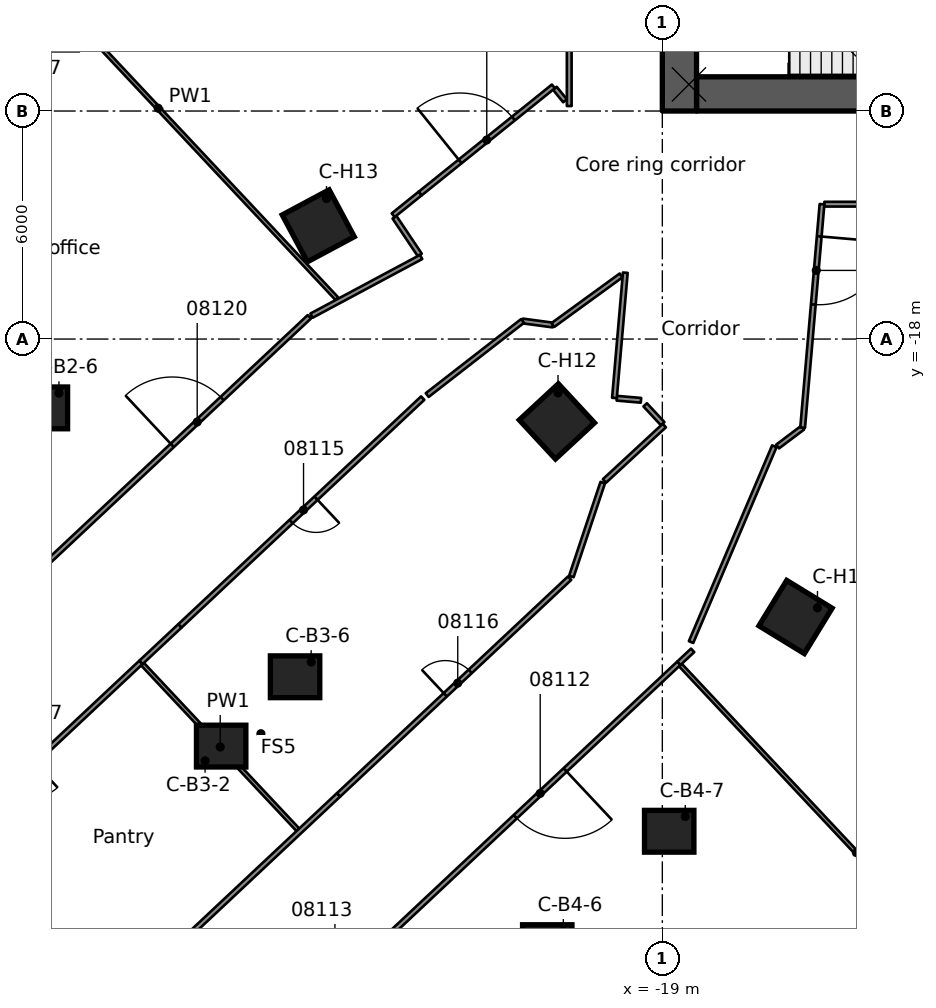
"""IFC4 building model, lengths in metres.
Left out: names, types, materials, properties, quantities, classifications, styles, units other than length and angle.
Written with IfcOpenShell. Run it as: python <this file> out.ifc"""

import sys

from ifc_helpers import new_model, si_unit, direction, frame, frame_2d, origin, origin_2d, place, context, subcontext, project, spatial, rectangle, extrude, element, fill, save


model = new_model("IFC4")
c1 = context("Model", 3, precision=1e-05, world=origin(), true_north=direction((0.0, 1.0)))
c2 = subcontext(c1, "Body", "Model", "MODEL_VIEW")
j1 = project(units=[si_unit("LENGTHUNIT", "METRE"), si_unit("PLANEANGLEUNIT", "RADIAN")], contexts=[c1])
p1 = place(None, origin())
s1 = spatial("IfcSite", under=j1, at=p1, CompositionType="ELEMENT")
p2 = place(p1, origin())
s2 = spatial("IfcBuilding", under=s1, at=p2, CompositionType="ELEMENT")
p3 = place(p2, frame((0.0, 0.0, 37.3)))
s3 = spatial("IfcBuildingStorey", under=s2, at=p3, CompositionType="ELEMENT", Elevation=37.3)
p4 = place(p3, frame((-18.1, -11.55, 0.0), z_axis=(0.0, 0.0, 1.0), x_axis=(1.0, 0.0, 0.0)))
e1 = element("IfcWall", 1, at=p4, inside=s3, PredefinedType="SHEAR", context=c2, shape_type="SweptSolid", body=[
    extrude(rectangle(XDim=9.2, YDim=0.9, at=frame_2d((4.6, 0.0))), origin(), (0.0, 0.0, 1.0), 3.5),
])
p5 = place(p4, frame((5.1, 0.0, 0.0)))
e2 = element("IfcOpeningElement", 2, at=p5, cuts=e1, PredefinedType="OPENING", context=c2, shape_type="SweptSolid", body=[
    extrude(rectangle(XDim=1.1, YDim=2.1, at=frame_2d((0.55, 1.05))), frame((0.0, 0.46, 0.0), z_axis=(0.0, -1.0, 0.0), x_axis=(1.0, 0.0, 0.0)), (0.0, 0.0, 1.0), 0.92),
])
p6 = place(p3, frame((-18.55, -12.0, 0.0), z_axis=(0.0, 0.0, 1.0), x_axis=(0.0, 1.0, 0.0)))
e3 = element("IfcWall", 3, at=p6, inside=s3, PredefinedType="SHEAR", context=c2, shape_type="SweptSolid", body=[
    extrude(rectangle(XDim=24.0, YDim=0.9, at=frame_2d((12.0, 0.0))), origin(), (0.0, 0.0, 1.0), 3.5),
])
p7 = place(p6, frame((10.1, 0.0, 0.0)))
e4 = element("IfcOpeningElement", 4, at=p7, cuts=e3, PredefinedType="OPENING", context=c2, shape_type="SweptSolid", body=[
    extrude(rectangle(XDim=1.8, YDim=2.1, at=frame_2d((0.9, 1.05))), frame((0.0, 0.46, 0.0), z_axis=(0.0, -1.0, 0.0), x_axis=(1.0, 0.0, 0.0)), (0.0, 0.0, 1.0), 0.92),
])
for number, where, z_axis, x_axis in (
    (5, (-35.3, -19.811, 0.0), (0.0, 0.0, 1.0), (1.0, 0.0, 0.0)),
    (6, (-30.609, -28.71, 0.0), (0.0, 0.0, 1.0), (1.0, 0.0, 0.0)),
    (7, (-28.664, -26.886, 0.0), (0.0, 0.0, 1.0), (1.0, 0.0, 0.0)),
    (8, (-22.028, -33.961, 0.0), (0.0, 0.0, 1.0), (1.0, 0.0, 0.0)),
    (9, (-18.819, -30.951, 0.0), (0.0, 0.0, 1.0), (1.0, 0.0, 0.0)),
):
    element("IfcColumn", number, at=place(p3, frame(where, z_axis=z_axis, x_axis=x_axis)), inside=s3, PredefinedType="COLUMN", context=c2, shape_type="SweptSolid", body=[
        extrude(rectangle(XDim=1.3, YDim=1.1, at=origin_2d()), origin(), (0.0, 0.0, 1.0), 3.5),
    ])
for number, where, z_axis, x_axis in (
    (10, (-15.495, -25.313, 0.0), (0.0, 0.0, 1.0), (-0.522, -0.853, 0.0)),
    (11, (-21.774, -20.167, 0.0), (0.0, 0.0, 1.0), (-0.734, -0.68, 0.0)),
    (12, (-28.054, -15.021, 0.0), (0.0, 0.0, 1.0), (-0.882, -0.472, 0.0)),
):
    element("IfcColumn", number, at=place(p3, frame(where, z_axis=z_axis, x_axis=x_axis)), inside=s3, PredefinedType="COLUMN", context=c2, shape_type="SweptSolid", body=[
        extrude(rectangle(XDim=1.4, YDim=1.4, at=origin_2d()), origin(), (0.0, 0.0, 1.0), 3.5),
    ])
p8 = place(p3, frame((-25.382, -15.788, 0.0), z_axis=(0.0, 0.0, 1.0), x_axis=(-0.556395946592, 0.830917294691, 0.0)))
e13 = element("IfcWall", 13, at=p8, inside=s3, PredefinedType="PARTITIONING", context=c2, shape_type="SweptSolid", body=[
    extrude(rectangle(XDim=1.195, YDim=0.125, at=frame_2d((0.598, 0.0))), origin(), (0.0, 0.0, 1.0), 3.06),
])
p9 = place(p3, frame((-22.677, -17.524, 0.0), z_axis=(0.0, 0.0, 1.0), x_axis=(0.991054476668, -0.133457949465, 0.0)))
e14 = element("IfcWall", 14, at=p9, inside=s3, PredefinedType="PARTITIONING", context=c2, shape_type="SweptSolid", body=[
    extrude(rectangle(XDim=0.803, YDim=0.125, at=frame_2d((0.401, 0.0))), origin(), (0.0, 0.0, 1.0), 3.06),
])
p10 = place(p3, frame((-21.828, -11.401, 0.0), z_axis=(0.0, 0.0, 1.0), x_axis=(0.628685146217, -0.777659942987, 0.0)))
e15 = element("IfcWall", 15, at=p10, inside=s3, PredefinedType="PARTITIONING", context=c2, shape_type="SweptSolid", body=[
    extrude(rectangle(XDim=0.425, YDim=0.125, at=frame_2d((0.212, 0.0))), origin(), (0.0, 0.0, 1.0), 3.06),
])
p11 = place(p3, frame((-19.451, -19.731, 0.0), z_axis=(0.0, 0.0, 1.0), x_axis=(0.679953646653, -0.733255097768, 0.0)))
e16 = element("IfcWall", 16, at=p11, inside=s3, PredefinedType="PARTITIONING", context=c2, shape_type="SweptSolid", body=[
    extrude(rectangle(XDim=0.678, YDim=0.125, at=frame_2d((0.339, 0.0))), origin(), (0.0, 0.0, 1.0), 3.06),
])
p12 = place(p3, frame((-32.677, -26.556, 0.0), z_axis=(0.0, 0.0, 1.0), x_axis=(0.684221226116, -0.729274511918, 0.0)))
e17 = element("IfcWall", 17, at=p12, inside=s3, PredefinedType="PARTITIONING", context=c2, shape_type="SweptSolid", body=[
    extrude(rectangle(XDim=5.972, YDim=0.1, at=frame_2d((2.986, 0.0))), origin(), (0.0, 0.0, 1.0), 3.06),
])
p13 = place(p3, frame((-36.97, -6.912, 0.0), z_axis=(0.0, 0.0, 1.0), x_axis=(0.684169085262, -0.729323428098, 0.0)))
e18 = element("IfcWall", 18, at=p13, inside=s3, PredefinedType="PARTITIONING", context=c2, shape_type="SweptSolid", body=[
    extrude(rectangle(XDim=13.75, YDim=0.1, at=frame_2d((6.875, 0.0))), origin(), (0.0, 0.0, 1.0), 3.06),
])
p14 = place(p3, frame((-18.523, -26.579, 0.0), z_axis=(0.0, 0.0, 1.0), x_axis=(0.684146880737, -0.729344257246, 0.0)))
e19 = element("IfcWall", 19, at=p14, inside=s3, PredefinedType="PARTITIONING", context=c2, shape_type="SweptSolid", body=[
    extrude(rectangle(XDim=13.537, YDim=0.1, at=frame_2d((6.768, 0.0))), origin(), (0.0, 0.0, 1.0), 3.06),
])
p15 = place(p3, frame((-15.967, -20.828, 0.0), z_axis=(0.0, 0.0, 1.0), x_axis=(0.799039774709, 0.601278170594, 0.0)))
e20 = element("IfcWall", 20, at=p15, inside=s3, PredefinedType="PARTITIONING", context=c2, shape_type="SweptSolid", body=[
    extrude(rectangle(XDim=0.825, YDim=0.125, at=frame_2d((0.412, 0.0))), origin(), (0.0, 0.0, 1.0), 3.06),
])
p16 = place(p3, frame((-20.197, -19.557, 0.0), z_axis=(0.0, 0.0, 1.0), x_axis=(0.99624633496, -0.086563503153, 0.0)))
e21 = element("IfcWall", 21, at=p16, inside=s3, PredefinedType="PARTITIONING", context=c2, shape_type="SweptSolid", body=[
    extrude(rectangle(XDim=0.637, YDim=0.125, at=frame_2d((0.319, 0.0))), origin(), (0.0, 0.0, 1.0), 3.06),
])
p17 = place(p3, frame((-14.736, -14.451, 0.0), z_axis=(0.0, 0.0, 1.0), x_axis=(1.0, 0.0, 0.0)))
e22 = element("IfcWall", 22, at=p17, inside=s3, PredefinedType="PARTITIONING", context=c2, shape_type="SweptSolid", body=[
    extrude(rectangle(XDim=4.345, YDim=0.125, at=frame_2d((2.172, 0.0))), origin(), (0.0, 0.0, 1.0), 3.06),
])
p18 = place(p3, frame((-25.347, -15.84, 0.0), z_axis=(0.0, 0.0, 1.0), x_axis=(-0.881616399283, -0.471966656147, 0.0)))
e23 = element("IfcWall", 23, at=p18, inside=s3, PredefinedType="PARTITIONING", context=c2, shape_type="SweptSolid", body=[
    extrude(rectangle(XDim=3.271, YDim=0.125, at=frame_2d((1.636, 0.0))), origin(), (0.0, 0.0, 1.0), 3.06),
])
p19 = place(p3, frame((-25.187, -19.474, 0.0), z_axis=(0.0, 0.0, 1.0), x_axis=(0.789430829464, 0.613839527476, 0.0)))
e24 = element("IfcWall", 24, at=p19, inside=s3, PredefinedType="PARTITIONING", context=c2, shape_type="SweptSolid", body=[
    extrude(rectangle(XDim=3.177, YDim=0.125, at=frame_2d((1.588, 0.0))), origin(), (0.0, 0.0, 1.0), 3.06),
])
p20 = place(p3, frame((-25.373, -14.172, 0.0), z_axis=(0.0, 0.0, 1.0), x_axis=(0.779219787028, 0.626750766657, 0.0)))
e25 = element("IfcWall", 25, at=p20, inside=s3, PredefinedType="PARTITIONING", context=c2, shape_type="SweptSolid", body=[
    extrude(rectangle(XDim=4.5, YDim=0.125, at=frame_2d((2.25, 0.0))), origin(), (0.0, 0.0, 1.0), 3.06),
])
p21 = place(p20, frame((1.35, 0.0, 0.0)))
e26 = element("IfcOpeningElement", 26, at=p21, cuts=e25, PredefinedType="OPENING", context=c2, shape_type="SweptSolid", body=[
    extrude(rectangle(XDim=1.8, YDim=2.1, at=frame_2d((0.9, 1.05))), frame((0.0, 0.073, 0.0), z_axis=(0.0, -1.0, 0.0), x_axis=(1.0, 0.0, 0.0)), (0.0, 0.0, 1.0), 0.145),
])
p22 = place(p3, frame((-26.082, -14.742, 0.0), z_axis=(0.0, 0.0, 1.0), x_axis=(0.779030886705, 0.626985548127, 0.0)))
e27 = element("IfcWall", 27, at=p22, inside=s3, PredefinedType="PARTITIONING", context=c2, shape_type="SweptSolid", body=[
    extrude(rectangle(XDim=0.909, YDim=0.125, at=frame_2d((0.455, 0.0))), origin(), (0.0, 0.0, 1.0), 3.06),
])
p23 = place(p3, frame((-20.085, -16.326, 0.0), z_axis=(0.0, 0.0, 1.0), x_axis=(-0.80897376901, -0.587844742304, 0.0)))
e28 = element("IfcWall", 28, at=p23, inside=s3, PredefinedType="PARTITIONING", context=c2, shape_type="SweptSolid", body=[
    extrude(rectangle(XDim=2.22, YDim=0.125, at=frame_2d((1.11, 0.0))), origin(), (0.0, 0.0, 1.0), 3.06),
])
p24 = place(p3, frame((-20.522, -21.733, 0.0), z_axis=(0.0, 0.0, 1.0), x_axis=(0.733842634203, 0.679319503788, 0.0)))
e29 = element("IfcWall", 29, at=p24, inside=s3, PredefinedType="PARTITIONING", context=c2, shape_type="SweptSolid", body=[
    extrude(rectangle(XDim=2.145, YDim=0.125, at=frame_2d((1.072, 0.0))), origin(), (0.0, 0.0, 1.0), 3.06),
])
p25 = place(p3, frame((-18.566, -26.532, 0.0), z_axis=(0.0, 0.0, 1.0), x_axis=(0.729735589773, 0.683729456012, 0.0)))
e30 = element("IfcWall", 30, at=p25, inside=s3, PredefinedType="PARTITIONING", context=c2, shape_type="SweptSolid", body=[
    extrude(rectangle(XDim=0.499, YDim=0.125, at=frame_2d((0.25, 0.0))), origin(), (0.0, 0.0, 1.0), 3.06),
])
p26 = place(p3, frame((-32.72, -26.508, 0.0), z_axis=(0.0, 0.0, 1.0), x_axis=(0.729721133243, 0.683744884953, 0.0)))
e31 = element("IfcWall", 31, at=p26, inside=s3, PredefinedType="PARTITIONING", context=c2, shape_type="SweptSolid", body=[
    extrude(rectangle(XDim=1.407, YDim=0.125, at=frame_2d((0.704, 0.0))), origin(), (0.0, 0.0, 1.0), 3.06),
])
p27 = place(p3, frame((-18.566, -26.532, 0.0), z_axis=(0.0, 0.0, 1.0), x_axis=(-0.729338488461, -0.684153030578, 0.0)))
e32 = element("IfcWall", 32, at=p27, inside=s3, PredefinedType="PARTITIONING", context=c2, shape_type="SweptSolid", body=[
    extrude(rectangle(XDim=19.122, YDim=0.125, at=frame_2d((9.561, 0.0))), origin(), (0.0, 0.0, 1.0), 3.06),
])
p28 = place(p27, frame((4.101, 0.0, 0.0)))
e33 = element("IfcOpeningElement", 33, at=p28, cuts=e32, PredefinedType="OPENING", context=c2, shape_type="SweptSolid", body=[
    extrude(rectangle(XDim=1.8, YDim=2.1, at=frame_2d((0.9, 1.05))), frame((0.0, 0.073, 0.0), z_axis=(0.0, -1.0, 0.0), x_axis=(1.0, 0.0, 0.0)), (0.0, 0.0, 1.0), 0.145),
])
p29 = place(p27, frame((11.908, 0.0, 0.0)))
e34 = element("IfcOpeningElement", 34, at=p29, cuts=e32, PredefinedType="OPENING", context=c2, shape_type="SweptSolid", body=[
    extrude(rectangle(XDim=1.0, YDim=2.1, at=frame_2d((0.5, 1.05))), frame((0.0, 0.073, 0.0), z_axis=(0.0, -1.0, 0.0), x_axis=(1.0, 0.0, 0.0)), (0.0, 0.0, 1.0), 0.145),
])
p30 = place(p27, frame((16.357, 0.0, 0.0)))
e35 = element("IfcOpeningElement", 35, at=p30, cuts=e32, PredefinedType="OPENING", context=c2, shape_type="SweptSolid", body=[
    extrude(rectangle(XDim=1.0, YDim=2.1, at=frame_2d((0.5, 1.05))), frame((0.0, 0.073, 0.0), z_axis=(0.0, -1.0, 0.0), x_axis=(1.0, 0.0, 0.0)), (0.0, 0.0, 1.0), 0.145),
])
p31 = place(p3, frame((-36.715, -38.619, 0.0), z_axis=(0.0, 0.0, 1.0), x_axis=(0.729354194338, 0.684136287008, 0.0)))
e36 = element("IfcWall", 36, at=p31, inside=s3, PredefinedType="PARTITIONING", context=c2, shape_type="SweptSolid", body=[
    extrude(rectangle(XDim=12.607, YDim=0.125, at=frame_2d((6.304, 0.0))), origin(), (0.0, 0.0, 1.0), 3.06),
])
p32 = place(p3, frame((-27.52, -29.994, 0.0), z_axis=(0.0, 0.0, 1.0), x_axis=(0.729427587213, 0.684058034828, 0.0)))
e37 = element("IfcWall", 37, at=p32, inside=s3, PredefinedType="PARTITIONING", context=c2, shape_type="SweptSolid", body=[
    extrude(rectangle(XDim=8.335, YDim=0.125, at=frame_2d((4.168, 0.0))), origin(), (0.0, 0.0, 1.0), 3.06),
])
p33 = place(p32, frame((3.85, 0.0, 0.0)))
e38 = element("IfcOpeningElement", 38, at=p33, cuts=e37, PredefinedType="OPENING", context=c2, shape_type="SweptSolid", body=[
    extrude(rectangle(XDim=0.9, YDim=2.1, at=frame_2d((0.45, 1.05))), frame((0.0, 0.073, 0.0), z_axis=(0.0, -1.0, 0.0), x_axis=(1.0, 0.0, 0.0)), (0.0, 0.0, 1.0), 0.145),
])
p34 = place(p3, frame((-32.721, -26.509, 0.0), z_axis=(0.0, 0.0, 1.0), x_axis=(-0.729399894654, -0.684087562874, 0.0)))
e39 = element("IfcWall", 39, at=p34, inside=s3, PredefinedType="PARTITIONING", context=c2, shape_type="SweptSolid", body=[
    extrude(rectangle(XDim=8.54, YDim=0.125, at=frame_2d((4.27, 0.0))), origin(), (0.0, 0.0, 1.0), 3.06),
])
p35 = place(p34, frame((3.85, 0.0, 0.0)))
e40 = element("IfcOpeningElement", 40, at=p35, cuts=e39, PredefinedType="OPENING", context=c2, shape_type="SweptSolid", body=[
    extrude(rectangle(XDim=0.9, YDim=2.1, at=frame_2d((0.45, 1.05))), frame((0.0, 0.073, 0.0), z_axis=(0.0, -1.0, 0.0), x_axis=(1.0, 0.0, 0.0)), (0.0, 0.0, 1.0), 0.145),
])
p36 = place(p3, frame((-25.305, -19.554, 0.0), z_axis=(0.0, 0.0, 1.0), x_axis=(-0.729365065932, -0.684124696674, 0.0)))
e41 = element("IfcWall", 41, at=p36, inside=s3, PredefinedType="PARTITIONING", context=c2, shape_type="SweptSolid", body=[
    extrude(rectangle(XDim=8.759, YDim=0.125, at=frame_2d((4.379, 0.0))), origin(), (0.0, 0.0, 1.0), 3.06),
])
p37 = place(p36, frame((3.85, 0.0, 0.0)))
e42 = element("IfcOpeningElement", 42, at=p37, cuts=e41, PredefinedType="OPENING", context=c2, shape_type="SweptSolid", body=[
    extrude(rectangle(XDim=0.9, YDim=2.1, at=frame_2d((0.45, 1.05))), frame((0.0, 0.073, 0.0), z_axis=(0.0, -1.0, 0.0), x_axis=(1.0, 0.0, 0.0)), (0.0, 0.0, 1.0), 0.145),
])
p38 = place(p3, frame((-41.675, -29.971, 0.0), z_axis=(0.0, 0.0, 1.0), x_axis=(0.729357568135, 0.684132690203, 0.0)))
e43 = element("IfcWall", 43, at=p38, inside=s3, PredefinedType="PARTITIONING", context=c2, shape_type="SweptSolid", body=[
    extrude(rectangle(XDim=18.354, YDim=0.125, at=frame_2d((9.177, 0.0))), origin(), (0.0, 0.0, 1.0), 3.06),
])
p39 = place(p38, frame((13.408, 0.0, 0.0)))
e44 = element("IfcOpeningElement", 44, at=p39, cuts=e43, PredefinedType="OPENING", context=c2, shape_type="SweptSolid", body=[
    extrude(rectangle(XDim=1.8, YDim=2.1, at=frame_2d((0.9, 1.05))), frame((0.0, 0.073, 0.0), z_axis=(0.0, -1.0, 0.0), x_axis=(1.0, 0.0, 0.0)), (0.0, 0.0, 1.0), 0.145),
])
p40 = place(p38, frame((4.1, 0.0, 0.0)))
e45 = element("IfcOpeningElement", 45, at=p40, cuts=e43, PredefinedType="OPENING", context=c2, shape_type="SweptSolid", body=[
    extrude(rectangle(XDim=0.9, YDim=2.1, at=frame_2d((0.45, 1.05))), frame((0.0, 0.073, 0.0), z_axis=(0.0, -1.0, 0.0), x_axis=(1.0, 0.0, 0.0)), (0.0, 0.0, 1.0), 0.145),
])
p41 = place(p3, frame((-18.244, -25.973, 0.0), z_axis=(0.0, 0.0, 1.0), x_axis=(0.391349326708, 0.920242198818, 0.0)))
e46 = element("IfcWall", 46, at=p41, inside=s3, PredefinedType="PARTITIONING", context=c2, shape_type="SweptSolid", body=[
    extrude(rectangle(XDim=5.598, YDim=0.125, at=frame_2d((2.799, 0.0))), origin(), (0.0, 0.0, 1.0), 3.06),
])
p42 = place(p3, frame((-20.568, -21.776, 0.0), z_axis=(0.0, 0.0, 1.0), x_axis=(-0.316873991938, -0.948467644801, 0.0)))
e47 = element("IfcWall", 47, at=p42, inside=s3, PredefinedType="PARTITIONING", context=c2, shape_type="SweptSolid", body=[
    extrude(rectangle(XDim=2.606, YDim=0.125, at=frame_2d((1.303, 0.0))), origin(), (0.0, 0.0, 1.0), 3.06),
])
p43 = place(p3, frame((-14.798, -14.451, 0.0), z_axis=(0.0, 0.0, 1.0), x_axis=(-0.086395823817, -0.996260890343, 0.0)))
e48 = element("IfcWall", 48, at=p43, inside=s3, PredefinedType="PARTITIONING", context=c2, shape_type="SweptSolid", body=[
    extrude(rectangle(XDim=5.903, YDim=0.125, at=frame_2d((2.952, 0.0))), origin(), (0.0, 0.0, 1.0), 3.06),
])
p44 = place(p43, frame((0.85, 0.0, 0.0)))
e49 = element("IfcOpeningElement", 49, at=p44, cuts=e48, PredefinedType="OPENING", context=c2, shape_type="SweptSolid", body=[
    extrude(rectangle(XDim=1.8, YDim=2.1, at=frame_2d((0.9, 1.05))), frame((0.0, 0.073, 0.0), z_axis=(0.0, -1.0, 0.0), x_axis=(1.0, 0.0, 0.0)), (0.0, 0.0, 1.0), 0.145),
])
p45 = place(p3, frame((-20.26, -19.551, 0.0), z_axis=(0.0, 0.0, 1.0), x_axis=(0.086384498526, 0.996261872408, 0.0)))
e50 = element("IfcWall", 50, at=p45, inside=s3, PredefinedType="PARTITIONING", context=c2, shape_type="SweptSolid", body=[
    extrude(rectangle(XDim=3.31, YDim=0.125, at=frame_2d((1.655, 0.0))), origin(), (0.0, 0.0, 1.0), 3.06),
])
p46 = place(p3, frame((-21.45, -11.869, 0.0), z_axis=(0.0, 0.0, 1.0), x_axis=(0.0, 1.0, 0.0)))
e51 = element("IfcWall", 51, at=p46, inside=s3, PredefinedType="PARTITIONING", context=c2, shape_type="SweptSolid", body=[
    extrude(rectangle(XDim=26.255, YDim=0.125, at=frame_2d((13.127, 0.0))), origin(), (0.0, 0.0, 1.0), 3.06),
])
p47 = place(p46, frame((9.76, 0.0, 0.0)))
e52 = element("IfcOpeningElement", 52, at=p47, cuts=e51, PredefinedType="OPENING", context=c2, shape_type="SweptSolid", body=[
    extrude(rectangle(XDim=0.9, YDim=2.1, at=frame_2d((0.45, 1.05))), frame((0.0, 0.073, 0.0), z_axis=(0.0, -1.0, 0.0), x_axis=(1.0, 0.0, 0.0)), (0.0, 0.0, 1.0), 0.145),
])
p48 = place(p46, frame((22.668, 0.0, 0.0)))
e53 = element("IfcOpeningElement", 53, at=p48, cuts=e51, PredefinedType="OPENING", context=c2, shape_type="SweptSolid", body=[
    extrude(rectangle(XDim=1.1, YDim=2.1, at=frame_2d((0.55, 1.05))), frame((0.0, 0.073, 0.0), z_axis=(0.0, -1.0, 0.0), x_axis=(1.0, 0.0, 0.0)), (0.0, 0.0, 1.0), 0.145),
])
p49 = place(p28, origin())
e54 = element("IfcDoor", 54, at=p49, inside=s3, OperationType="DOUBLE_DOOR_SINGLE_SWING", PredefinedType="DOOR", context=c2, shape_type="SweptSolid", body=[
    extrude(rectangle(XDim=1.8, YDim=2.1, at=frame_2d((0.9, 1.05))), frame((0.0, 0.025, 0.0), z_axis=(0.0, -1.0, 0.0), x_axis=(1.0, 0.0, 0.0)), (0.0, 0.0, 1.0), 0.05),
])
fill(e33, e54)
p50 = place(p37, origin())
e55 = element("IfcDoor", 55, at=p50, inside=s3, OperationType="SINGLE_SWING_LEFT", PredefinedType="DOOR", context=c2, shape_type="SweptSolid", body=[
    extrude(rectangle(XDim=0.9, YDim=2.1, at=frame_2d((0.45, 1.05))), frame((0.0, 0.025, 0.0), z_axis=(0.0, -1.0, 0.0), x_axis=(1.0, 0.0, 0.0)), (0.0, 0.0, 1.0), 0.05),
])
fill(e42, e55)
p51 = place(p33, origin())
e56 = element("IfcDoor", 56, at=p51, inside=s3, OperationType="SINGLE_SWING_RIGHT", PredefinedType="DOOR", context=c2, shape_type="SweptSolid", body=[
    extrude(rectangle(XDim=0.9, YDim=2.1, at=frame_2d((0.45, 1.05))), frame((0.0, 0.025, 0.0), z_axis=(0.0, -1.0, 0.0), x_axis=(1.0, 0.0, 0.0)), (0.0, 0.0, 1.0), 0.05),
])
fill(e38, e56)
p52 = place(p39, origin())
e57 = element("IfcDoor", 57, at=p52, inside=s3, OperationType="DOUBLE_DOOR_SINGLE_SWING", PredefinedType="DOOR", context=c2, shape_type="SweptSolid", body=[
    extrude(rectangle(XDim=1.8, YDim=2.1, at=frame_2d((0.9, 1.05))), frame((0.0, 0.025, 0.0), z_axis=(0.0, -1.0, 0.0), x_axis=(1.0, 0.0, 0.0)), (0.0, 0.0, 1.0), 0.05),
])
fill(e44, e57)
p53 = place(p21, origin())
e58 = element("IfcDoor", 58, at=p53, inside=s3, OperationType="DOUBLE_DOOR_SINGLE_SWING", PredefinedType="DOOR", context=c2, shape_type="SweptSolid", body=[
    extrude(rectangle(XDim=1.8, YDim=2.1, at=frame_2d((0.9, 1.05))), frame((0.0, 0.025, 0.0), z_axis=(0.0, -1.0, 0.0), x_axis=(1.0, 0.0, 0.0)), (0.0, 0.0, 1.0), 0.05),
])
fill(e26, e58)
p54 = place(p44, origin())
e59 = element("IfcDoor", 59, at=p54, inside=s3, OperationType="DOUBLE_DOOR_SINGLE_SWING", PredefinedType="DOOR", context=c2, shape_type="SweptSolid", body=[
    extrude(rectangle(XDim=1.8, YDim=2.1, at=frame_2d((0.9, 1.05))), frame((0.0, 0.025, 0.0), z_axis=(0.0, -1.0, 0.0), x_axis=(1.0, 0.0, 0.0)), (0.0, 0.0, 1.0), 0.05),
])
fill(e49, e59)
save(model, sys.argv[1])
